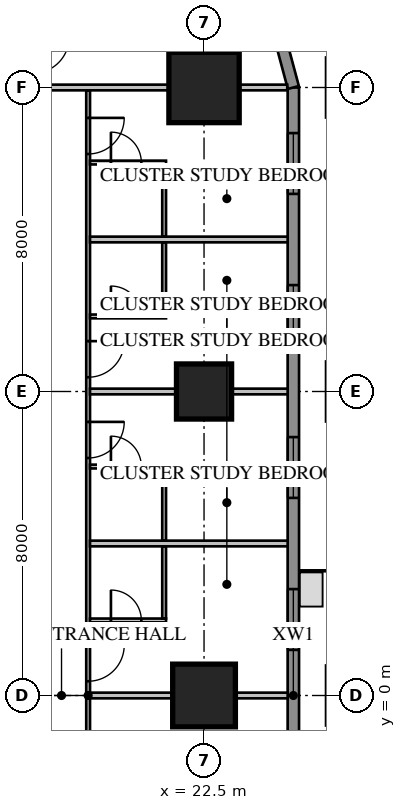
"""IFC4 building model, lengths in metres.
Left out: names, types, materials, properties, quantities, classifications, styles, units other than length and angle.
Written with IfcOpenShell. Run it as: python <this file> out.ifc"""

import sys

from ifc_helpers import new_model, si_unit, direction, frame, frame_2d, origin, origin_2d, place, context, subcontext, project, spatial, rectangle, extrude, element, fill, save


model = new_model("IFC4")
c1 = context("Model", 3, precision=1e-05, world=origin(), true_north=direction((0.0, 1.0)))
c2 = subcontext(c1, "Body", "Model", "MODEL_VIEW")
j1 = project(units=[si_unit("LENGTHUNIT", "METRE"), si_unit("PLANEANGLEUNIT", "RADIAN")], contexts=[c1])
p1 = place(None, origin())
s1 = spatial("IfcSite", under=j1, at=p1, CompositionType="ELEMENT")
p2 = place(p1, origin())
s2 = spatial("IfcBuilding", under=s1, at=p2, CompositionType="ELEMENT")
p3 = place(p2, frame((0.0, 0.0, 39.1)))
s3 = spatial("IfcBuildingStorey", under=s2, at=p3, CompositionType="ELEMENT", Elevation=39.1)
p4 = place(p3, frame((22.5, 0.0, 0.0), z_axis=(0.0, 0.0, 1.0), x_axis=(1.0, 0.0, 0.0)))
e1 = element("IfcColumn", 1, at=p4, inside=s3, PredefinedType="COLUMN", context=c2, shape_type="SweptSolid", body=[
    extrude(rectangle(XDim=1.65, YDim=1.65, at=origin_2d()), origin(), (0.0, 0.0, 1.0), 3.85),
])
p5 = place(p3, frame((22.5, 8.0, 0.0), z_axis=(0.0, 0.0, 1.0), x_axis=(1.0, 0.0, 0.0)))
e2 = element("IfcColumn", 2, at=p5, inside=s3, PredefinedType="COLUMN", context=c2, shape_type="SweptSolid", body=[
    extrude(rectangle(XDim=1.45, YDim=1.45, at=origin_2d()), origin(), (0.0, 0.0, 1.0), 3.85),
])
p6 = place(p3, frame((22.5, 16.0, 0.0), z_axis=(0.0, 0.0, 1.0), x_axis=(1.0, 0.0, 0.0)))
e3 = element("IfcColumn", 3, at=p6, inside=s3, PredefinedType="COLUMN", context=c2, shape_type="SweptSolid", body=[
    extrude(rectangle(XDim=1.85, YDim=1.85, at=origin_2d()), origin(), (0.0, 0.0, 1.0), 3.85),
])
p7 = place(p3, frame((24.85, -16.0, 0.0), z_axis=(0.0, 0.0, 1.0), x_axis=(0.0, 1.0, 0.0)))
e4 = element("IfcWall", 4, at=p7, inside=s3, PredefinedType="SOLIDWALL", context=c2, shape_type="SweptSolid", body=[
    extrude(rectangle(XDim=32.0, YDim=0.3, at=frame_2d((16.0, 0.0))), origin(), (0.0, 0.0, 1.0), 3.65),
])
p8 = place(p7, frame((1.2, 0.0, 0.75)))
e5 = element("IfcOpeningElement", 5, at=p8, cuts=e4, PredefinedType="OPENING", context=c2, shape_type="SweptSolid", body=[
    extrude(rectangle(XDim=1.6, YDim=1.8, at=frame_2d((0.8, 0.9))), frame((0.0, 0.17, 0.0), z_axis=(0.0, -1.0, 0.0), x_axis=(1.0, 0.0, 0.0)), (0.0, 0.0, 1.0), 0.34),
])
p9 = place(p7, frame((5.2, 0.0, 0.75)))
e6 = element("IfcOpeningElement", 6, at=p9, cuts=e4, PredefinedType="OPENING", context=c2, shape_type="SweptSolid", body=[
    extrude(rectangle(XDim=1.6, YDim=1.8, at=frame_2d((0.8, 0.9))), frame((0.0, 0.17, 0.0), z_axis=(0.0, -1.0, 0.0), x_axis=(1.0, 0.0, 0.0)), (0.0, 0.0, 1.0), 0.34),
])
p10 = place(p7, frame((17.2, 0.0, 0.75)))
e7 = element("IfcOpeningElement", 7, at=p10, cuts=e4, PredefinedType="OPENING", context=c2, shape_type="SweptSolid", body=[
    extrude(rectangle(XDim=1.6, YDim=1.8, at=frame_2d((0.8, 0.9))), frame((0.0, 0.17, 0.0), z_axis=(0.0, -1.0, 0.0), x_axis=(1.0, 0.0, 0.0)), (0.0, 0.0, 1.0), 0.34),
])
p11 = place(p7, frame((21.2, 0.0, 0.75)))
e8 = element("IfcOpeningElement", 8, at=p11, cuts=e4, PredefinedType="OPENING", context=c2, shape_type="SweptSolid", body=[
    extrude(rectangle(XDim=1.6, YDim=1.8, at=frame_2d((0.8, 0.9))), frame((0.0, 0.17, 0.0), z_axis=(0.0, -1.0, 0.0), x_axis=(1.0, 0.0, 0.0)), (0.0, 0.0, 1.0), 0.34),
])
p12 = place(p7, frame((25.2, 0.0, 0.75)))
e9 = element("IfcOpeningElement", 9, at=p12, cuts=e4, PredefinedType="OPENING", context=c2, shape_type="SweptSolid", body=[
    extrude(rectangle(XDim=1.6, YDim=1.8, at=frame_2d((0.8, 0.9))), frame((0.0, 0.17, 0.0), z_axis=(0.0, -1.0, 0.0), x_axis=(1.0, 0.0, 0.0)), (0.0, 0.0, 1.0), 0.34),
])
p13 = place(p7, frame((29.2, 0.0, 0.75)))
e10 = element("IfcOpeningElement", 10, at=p13, cuts=e4, PredefinedType="OPENING", context=c2, shape_type="SweptSolid", body=[
    extrude(rectangle(XDim=1.6, YDim=1.8, at=frame_2d((0.8, 0.9))), frame((0.0, 0.17, 0.0), z_axis=(0.0, -1.0, 0.0), x_axis=(1.0, 0.0, 0.0)), (0.0, 0.0, 1.0), 0.34),
])
p14 = place(p7, frame((8.8, 0.0, 0.75)))
e11 = element("IfcOpeningElement", 11, at=p14, cuts=e4, PredefinedType="OPENING", context=c2, shape_type="SweptSolid", body=[
    extrude(rectangle(XDim=2.4, YDim=1.8, at=frame_2d((1.2, 0.9))), frame((0.0, 0.17, 0.0), z_axis=(0.0, -1.0, 0.0), x_axis=(1.0, 0.0, 0.0)), (0.0, 0.0, 1.0), 0.34),
])
p15 = place(p7, frame((13.812, 0.0, 0.0)))
e12 = element("IfcOpeningElement", 12, at=p15, cuts=e4, PredefinedType="OPENING", context=c2, shape_type="SweptSolid", body=[
    extrude(rectangle(XDim=1.0, YDim=2.4, at=frame_2d((0.5, 1.2))), frame((0.0, 0.17, 0.0), z_axis=(0.0, -1.0, 0.0), x_axis=(1.0, 0.0, 0.0)), (0.0, 0.0, 1.0), 0.34),
])
p16 = place(p3, frame((24.85, 16.0, 0.0), z_axis=(0.0, 0.0, 1.0), x_axis=(-0.258839972501, 0.965920218567, 0.0)))
e13 = element("IfcWall", 13, at=p16, inside=s3, PredefinedType="SOLIDWALL", context=c2, shape_type="SweptSolid", body=[
    extrude(rectangle(XDim=4.581, YDim=0.3, at=frame_2d((2.291, 0.0))), origin(), (0.0, 0.0, 1.0), 3.65),
])
p17 = place(p3, frame((19.45, -15.925, 0.0), z_axis=(0.0, 0.0, 1.0), x_axis=(0.0, 1.0, 0.0)))
e14 = element("IfcWall", 14, at=p17, inside=s3, PredefinedType="PARTITIONING", context=c2, shape_type="SweptSolid", body=[
    extrude(rectangle(XDim=31.85, YDim=0.1, at=frame_2d((15.925, 0.0))), origin(), (0.0, 0.0, 1.0), 3.65),
])
p18 = place(p17, frame((10.125, 0.0, 0.0)))
e15 = element("IfcOpeningElement", 15, at=p18, cuts=e14, PredefinedType="OPENING", context=c2, shape_type="SweptSolid", body=[
    extrude(rectangle(XDim=1.0, YDim=2.1, at=frame_2d((0.5, 1.05))), frame((0.0, 0.07, 0.0), z_axis=(0.0, -1.0, 0.0), x_axis=(1.0, 0.0, 0.0)), (0.0, 0.0, 1.0), 0.14),
])
p19 = place(p17, frame((8.3, 0.0, 0.0)))
e16 = element("IfcOpeningElement", 16, at=p19, cuts=e14, PredefinedType="OPENING", context=c2, shape_type="SweptSolid", body=[
    extrude(rectangle(XDim=0.8, YDim=2.1, at=frame_2d((0.4, 1.05))), frame((0.0, 0.07, 0.0), z_axis=(0.0, -1.0, 0.0), x_axis=(1.0, 0.0, 0.0)), (0.0, 0.0, 1.0), 0.14),
])
p20 = place(p17, frame((0.3, 0.0, 0.0)))
e17 = element("IfcOpeningElement", 17, at=p20, cuts=e14, PredefinedType="OPENING", context=c2, shape_type="SweptSolid", body=[
    extrude(rectangle(XDim=0.95, YDim=2.1, at=frame_2d((0.475, 1.05))), frame((0.0, 0.07, 0.0), z_axis=(0.0, -1.0, 0.0), x_axis=(1.0, 0.0, 0.0)), (0.0, 0.0, 1.0), 0.14),
])
p21 = place(p17, frame((6.175, 0.0, 0.0)))
e18 = element("IfcOpeningElement", 18, at=p21, cuts=e14, PredefinedType="OPENING", context=c2, shape_type="SweptSolid", body=[
    extrude(rectangle(XDim=0.95, YDim=2.1, at=frame_2d((0.475, 1.05))), frame((0.0, 0.07, 0.0), z_axis=(0.0, -1.0, 0.0), x_axis=(1.0, 0.0, 0.0)), (0.0, 0.0, 1.0), 0.14),
])
p22 = place(p17, frame((16.3, 0.0, 0.0)))
e19 = element("IfcOpeningElement", 19, at=p22, cuts=e14, PredefinedType="OPENING", context=c2, shape_type="SweptSolid", body=[
    extrude(rectangle(XDim=0.95, YDim=2.1, at=frame_2d((0.475, 1.05))), frame((0.0, 0.07, 0.0), z_axis=(0.0, -1.0, 0.0), x_axis=(1.0, 0.0, 0.0)), (0.0, 0.0, 1.0), 0.14),
])
p23 = place(p17, frame((22.175, 0.0, 0.0)))
e20 = element("IfcOpeningElement", 20, at=p23, cuts=e14, PredefinedType="OPENING", context=c2, shape_type="SweptSolid", body=[
    extrude(rectangle(XDim=0.95, YDim=2.1, at=frame_2d((0.475, 1.05))), frame((0.0, 0.07, 0.0), z_axis=(0.0, -1.0, 0.0), x_axis=(1.0, 0.0, 0.0)), (0.0, 0.0, 1.0), 0.14),
])
p24 = place(p17, frame((24.3, 0.0, 0.0)))
e21 = element("IfcOpeningElement", 21, at=p24, cuts=e14, PredefinedType="OPENING", context=c2, shape_type="SweptSolid", body=[
    extrude(rectangle(XDim=0.95, YDim=2.1, at=frame_2d((0.475, 1.05))), frame((0.0, 0.07, 0.0), z_axis=(0.0, -1.0, 0.0), x_axis=(1.0, 0.0, 0.0)), (0.0, 0.0, 1.0), 0.14),
])
p25 = place(p17, frame((30.175, 0.0, 0.0)))
e22 = element("IfcOpeningElement", 22, at=p25, cuts=e14, PredefinedType="OPENING", context=c2, shape_type="SweptSolid", body=[
    extrude(rectangle(XDim=0.95, YDim=2.1, at=frame_2d((0.475, 1.05))), frame((0.0, 0.07, 0.0), z_axis=(0.0, -1.0, 0.0), x_axis=(1.0, 0.0, 0.0)), (0.0, 0.0, 1.0), 0.14),
])
p26 = place(p3, frame((19.5, 0.0, 0.0), z_axis=(0.0, 0.0, 1.0), x_axis=(1.0, 0.0, 0.0)))
e23 = element("IfcWall", 23, at=p26, inside=s3, PredefinedType="PARTITIONING", context=c2, shape_type="SweptSolid", body=[
    extrude(rectangle(XDim=5.2, YDim=0.15, at=frame_2d((2.6, 0.0))), origin(), (0.0, 0.0, 1.0), 2.957),
])
for number, where, z_axis, x_axis in (
    (24, (19.5, 4.0, 0.0), (0.0, 0.0, 1.0), (1.0, 0.0, 0.0)),
    (25, (19.5, 8.0, 0.0), (0.0, 0.0, 1.0), (1.0, 0.0, 0.0)),
    (26, (19.5, 12.0, 0.0), (0.0, 0.0, 1.0), (1.0, 0.0, 0.0)),
):
    element("IfcWall", number, at=place(p3, frame(where, z_axis=z_axis, x_axis=x_axis)), inside=s3, PredefinedType="PARTITIONING", context=c2, shape_type="SweptSolid", body=[
        extrude(rectangle(XDim=5.2, YDim=0.15, at=frame_2d((2.6, 0.0))), origin(), (0.0, 0.0, 1.0), 3.65),
    ])
p27 = place(p3, frame((18.1, 16.0, 0.0), z_axis=(0.0, 0.0, 1.0), x_axis=(1.0, 0.0, 0.0)))
e27 = element("IfcWall", 27, at=p27, inside=s3, PredefinedType="PARTITIONING", context=c2, shape_type="SweptSolid", body=[
    extrude(rectangle(XDim=6.589, YDim=0.15, at=frame_2d((3.295, 0.0))), origin(), (0.0, 0.0, 1.0), 3.65),
])
p28 = place(p3, frame((19.5, 1.975, 0.0), z_axis=(0.0, 0.0, 1.0), x_axis=(1.0, 0.0, 0.0)))
e28 = element("IfcWall", 28, at=p28, inside=s3, PredefinedType="PARTITIONING", context=c2, shape_type="SweptSolid", body=[
    extrude(rectangle(XDim=2.0, YDim=0.1, at=frame_2d((1.0, 0.0))), origin(), (0.0, 0.0, 1.0), 3.65),
])
p29 = place(p28, frame((0.55, 0.0, 0.0)))
e29 = element("IfcOpeningElement", 29, at=p29, cuts=e28, PredefinedType="OPENING", context=c2, shape_type="SweptSolid", body=[
    extrude(rectangle(XDim=0.8, YDim=2.1, at=frame_2d((0.4, 1.05))), frame((0.0, 0.07, 0.0), z_axis=(0.0, -1.0, 0.0), x_axis=(1.0, 0.0, 0.0)), (0.0, 0.0, 1.0), 0.14),
])
p30 = place(p3, frame((21.45, 2.025, 0.0), z_axis=(0.0, 0.0, 1.0), x_axis=(0.0, 1.0, 0.0)))
e30 = element("IfcWall", 30, at=p30, inside=s3, PredefinedType="PARTITIONING", context=c2, shape_type="SweptSolid", body=[
    extrude(rectangle(XDim=1.9, YDim=0.1, at=frame_2d((0.95, 0.0))), origin(), (0.0, 0.0, 1.0), 3.65),
])
p31 = place(p3, frame((19.5, 6.025, 0.0), z_axis=(0.0, 0.0, 1.0), x_axis=(1.0, 0.0, 0.0)))
e31 = element("IfcWall", 31, at=p31, inside=s3, PredefinedType="PARTITIONING", context=c2, shape_type="SweptSolid", body=[
    extrude(rectangle(XDim=2.0, YDim=0.1, at=frame_2d((1.0, 0.0))), origin(), (0.0, 0.0, 1.0), 3.65),
])
p32 = place(p31, frame((0.55, 0.0, 0.0)))
e32 = element("IfcOpeningElement", 32, at=p32, cuts=e31, PredefinedType="OPENING", context=c2, shape_type="SweptSolid", body=[
    extrude(rectangle(XDim=0.8, YDim=2.1, at=frame_2d((0.4, 1.05))), frame((0.0, 0.07, 0.0), z_axis=(0.0, -1.0, 0.0), x_axis=(1.0, 0.0, 0.0)), (0.0, 0.0, 1.0), 0.14),
])
p33 = place(p3, frame((21.45, 4.075, 0.0), z_axis=(0.0, 0.0, 1.0), x_axis=(0.0, 1.0, 0.0)))
e33 = element("IfcWall", 33, at=p33, inside=s3, PredefinedType="PARTITIONING", context=c2, shape_type="SweptSolid", body=[
    extrude(rectangle(XDim=1.9, YDim=0.1, at=frame_2d((0.95, 0.0))), origin(), (0.0, 0.0, 1.0), 3.65),
])
p34 = place(p3, frame((19.5, 9.975, 0.0), z_axis=(0.0, 0.0, 1.0), x_axis=(1.0, 0.0, 0.0)))
e34 = element("IfcWall", 34, at=p34, inside=s3, PredefinedType="PARTITIONING", context=c2, shape_type="SweptSolid", body=[
    extrude(rectangle(XDim=2.0, YDim=0.1, at=frame_2d((1.0, 0.0))), origin(), (0.0, 0.0, 1.0), 3.65),
])
p35 = place(p34, frame((0.55, 0.0, 0.0)))
e35 = element("IfcOpeningElement", 35, at=p35, cuts=e34, PredefinedType="OPENING", context=c2, shape_type="SweptSolid", body=[
    extrude(rectangle(XDim=0.8, YDim=2.1, at=frame_2d((0.4, 1.05))), frame((0.0, 0.07, 0.0), z_axis=(0.0, -1.0, 0.0), x_axis=(1.0, 0.0, 0.0)), (0.0, 0.0, 1.0), 0.14),
])
p36 = place(p3, frame((21.45, 10.025, 0.0), z_axis=(0.0, 0.0, 1.0), x_axis=(0.0, 1.0, 0.0)))
e36 = element("IfcWall", 36, at=p36, inside=s3, PredefinedType="PARTITIONING", context=c2, shape_type="SweptSolid", body=[
    extrude(rectangle(XDim=1.9, YDim=0.1, at=frame_2d((0.95, 0.0))), origin(), (0.0, 0.0, 1.0), 3.65),
])
p37 = place(p3, frame((19.5, 14.025, 0.0), z_axis=(0.0, 0.0, 1.0), x_axis=(1.0, 0.0, 0.0)))
e37 = element("IfcWall", 37, at=p37, inside=s3, PredefinedType="PARTITIONING", context=c2, shape_type="SweptSolid", body=[
    extrude(rectangle(XDim=2.0, YDim=0.1, at=frame_2d((1.0, 0.0))), origin(), (0.0, 0.0, 1.0), 3.65),
])
p38 = place(p37, frame((0.55, 0.0, 0.0)))
e38 = element("IfcOpeningElement", 38, at=p38, cuts=e37, PredefinedType="OPENING", context=c2, shape_type="SweptSolid", body=[
    extrude(rectangle(XDim=0.8, YDim=2.1, at=frame_2d((0.4, 1.05))), frame((0.0, 0.07, 0.0), z_axis=(0.0, -1.0, 0.0), x_axis=(1.0, 0.0, 0.0)), (0.0, 0.0, 1.0), 0.14),
])
p39 = place(p3, frame((21.45, 12.075, 0.0), z_axis=(0.0, 0.0, 1.0), x_axis=(0.0, 1.0, 0.0)))
e39 = element("IfcWall", 39, at=p39, inside=s3, PredefinedType="PARTITIONING", context=c2, shape_type="SweptSolid", body=[
    extrude(rectangle(XDim=1.9, YDim=0.1, at=frame_2d((0.95, 0.0))), origin(), (0.0, 0.0, 1.0), 3.65),
])
p40 = place(p10, origin())
e40 = element("IfcWindow", 40, at=p40, inside=s3, PartitioningType="SINGLE_PANEL", PredefinedType="WINDOW", context=c2, shape_type="SweptSolid", body=[
    extrude(rectangle(XDim=1.6, YDim=1.8, at=frame_2d((0.8, 0.9))), frame((0.0, 0.03, 0.0), z_axis=(0.0, -1.0, 0.0), x_axis=(1.0, 0.0, 0.0)), (0.0, 0.0, 1.0), 0.06),
])
fill(e7, e40)
p41 = place(p11, origin())
e41 = element("IfcWindow", 41, at=p41, inside=s3, PartitioningType="SINGLE_PANEL", PredefinedType="WINDOW", context=c2, shape_type="SweptSolid", body=[
    extrude(rectangle(XDim=1.6, YDim=1.8, at=frame_2d((0.8, 0.9))), frame((0.0, 0.03, 0.0), z_axis=(0.0, -1.0, 0.0), x_axis=(1.0, 0.0, 0.0)), (0.0, 0.0, 1.0), 0.06),
])
fill(e8, e41)
p42 = place(p12, origin())
e42 = element("IfcWindow", 42, at=p42, inside=s3, PartitioningType="SINGLE_PANEL", PredefinedType="WINDOW", context=c2, shape_type="SweptSolid", body=[
    extrude(rectangle(XDim=1.6, YDim=1.8, at=frame_2d((0.8, 0.9))), frame((0.0, 0.03, 0.0), z_axis=(0.0, -1.0, 0.0), x_axis=(1.0, 0.0, 0.0)), (0.0, 0.0, 1.0), 0.06),
])
fill(e9, e42)
p43 = place(p13, origin())
e43 = element("IfcWindow", 43, at=p43, inside=s3, PartitioningType="SINGLE_PANEL", PredefinedType="WINDOW", context=c2, shape_type="SweptSolid", body=[
    extrude(rectangle(XDim=1.6, YDim=1.8, at=frame_2d((0.8, 0.9))), frame((0.0, 0.03, 0.0), z_axis=(0.0, -1.0, 0.0), x_axis=(1.0, 0.0, 0.0)), (0.0, 0.0, 1.0), 0.06),
])
fill(e10, e43)
p44 = place(p22, origin())
e44 = element("IfcDoor", 44, at=p44, inside=s3, OperationType="SINGLE_SWING_RIGHT", PredefinedType="DOOR", context=c2, shape_type="SweptSolid", body=[
    extrude(rectangle(XDim=0.95, YDim=2.1, at=frame_2d((0.475, 1.05))), frame((0.0, 0.025, 0.0), z_axis=(0.0, -1.0, 0.0), x_axis=(1.0, 0.0, 0.0)), (0.0, 0.0, 1.0), 0.05),
])
fill(e19, e44)
p45 = place(p29, origin())
e45 = element("IfcDoor", 45, at=p45, inside=s3, OperationType="SINGLE_SWING_LEFT", PredefinedType="DOOR", context=c2, shape_type="SweptSolid", body=[
    extrude(rectangle(XDim=0.8, YDim=2.1, at=frame_2d((0.4, 1.05))), frame((0.0, 0.025, 0.0), z_axis=(0.0, -1.0, 0.0), x_axis=(1.0, 0.0, 0.0)), (0.0, 0.0, 1.0), 0.05),
])
fill(e29, e45)
p46 = place(p23, origin())
e46 = element("IfcDoor", 46, at=p46, inside=s3, OperationType="SINGLE_SWING_RIGHT", PredefinedType="DOOR", context=c2, shape_type="SweptSolid", body=[
    extrude(rectangle(XDim=0.95, YDim=2.1, at=frame_2d((0.475, 1.05))), frame((0.0, 0.025, 0.0), z_axis=(0.0, -1.0, 0.0), x_axis=(1.0, 0.0, 0.0)), (0.0, 0.0, 1.0), 0.05),
])
fill(e20, e46)
p47 = place(p32, origin())
e47 = element("IfcDoor", 47, at=p47, inside=s3, OperationType="SINGLE_SWING_LEFT", PredefinedType="DOOR", context=c2, shape_type="SweptSolid", body=[
    extrude(rectangle(XDim=0.8, YDim=2.1, at=frame_2d((0.4, 1.05))), frame((0.0, 0.025, 0.0), z_axis=(0.0, -1.0, 0.0), x_axis=(1.0, 0.0, 0.0)), (0.0, 0.0, 1.0), 0.05),
])
fill(e32, e47)
p48 = place(p24, origin())
e48 = element("IfcDoor", 48, at=p48, inside=s3, OperationType="SINGLE_SWING_RIGHT", PredefinedType="DOOR", context=c2, shape_type="SweptSolid", body=[
    extrude(rectangle(XDim=0.95, YDim=2.1, at=frame_2d((0.475, 1.05))), frame((0.0, 0.025, 0.0), z_axis=(0.0, -1.0, 0.0), x_axis=(1.0, 0.0, 0.0)), (0.0, 0.0, 1.0), 0.05),
])
fill(e21, e48)
p49 = place(p35, origin())
e49 = element("IfcDoor", 49, at=p49, inside=s3, OperationType="SINGLE_SWING_LEFT", PredefinedType="DOOR", context=c2, shape_type="SweptSolid", body=[
    extrude(rectangle(XDim=0.8, YDim=2.1, at=frame_2d((0.4, 1.05))), frame((0.0, 0.025, 0.0), z_axis=(0.0, -1.0, 0.0), x_axis=(1.0, 0.0, 0.0)), (0.0, 0.0, 1.0), 0.05),
])
fill(e35, e49)
p50 = place(p25, origin())
e50 = element("IfcDoor", 50, at=p50, inside=s3, OperationType="SINGLE_SWING_RIGHT", PredefinedType="DOOR", context=c2, shape_type="SweptSolid", body=[
    extrude(rectangle(XDim=0.95, YDim=2.1, at=frame_2d((0.475, 1.05))), frame((0.0, 0.025, 0.0), z_axis=(0.0, -1.0, 0.0), x_axis=(1.0, 0.0, 0.0)), (0.0, 0.0, 1.0), 0.05),
])
fill(e22, e50)
p51 = place(p38, origin())
e51 = element("IfcDoor", 51, at=p51, inside=s3, OperationType="SINGLE_SWING_LEFT", PredefinedType="DOOR", context=c2, shape_type="SweptSolid", body=[
    extrude(rectangle(XDim=0.8, YDim=2.1, at=frame_2d((0.4, 1.05))), frame((0.0, 0.025, 0.0), z_axis=(0.0, -1.0, 0.0), x_axis=(1.0, 0.0, 0.0)), (0.0, 0.0, 1.0), 0.05),
])
fill(e38, e51)
save(model, sys.argv[1])
